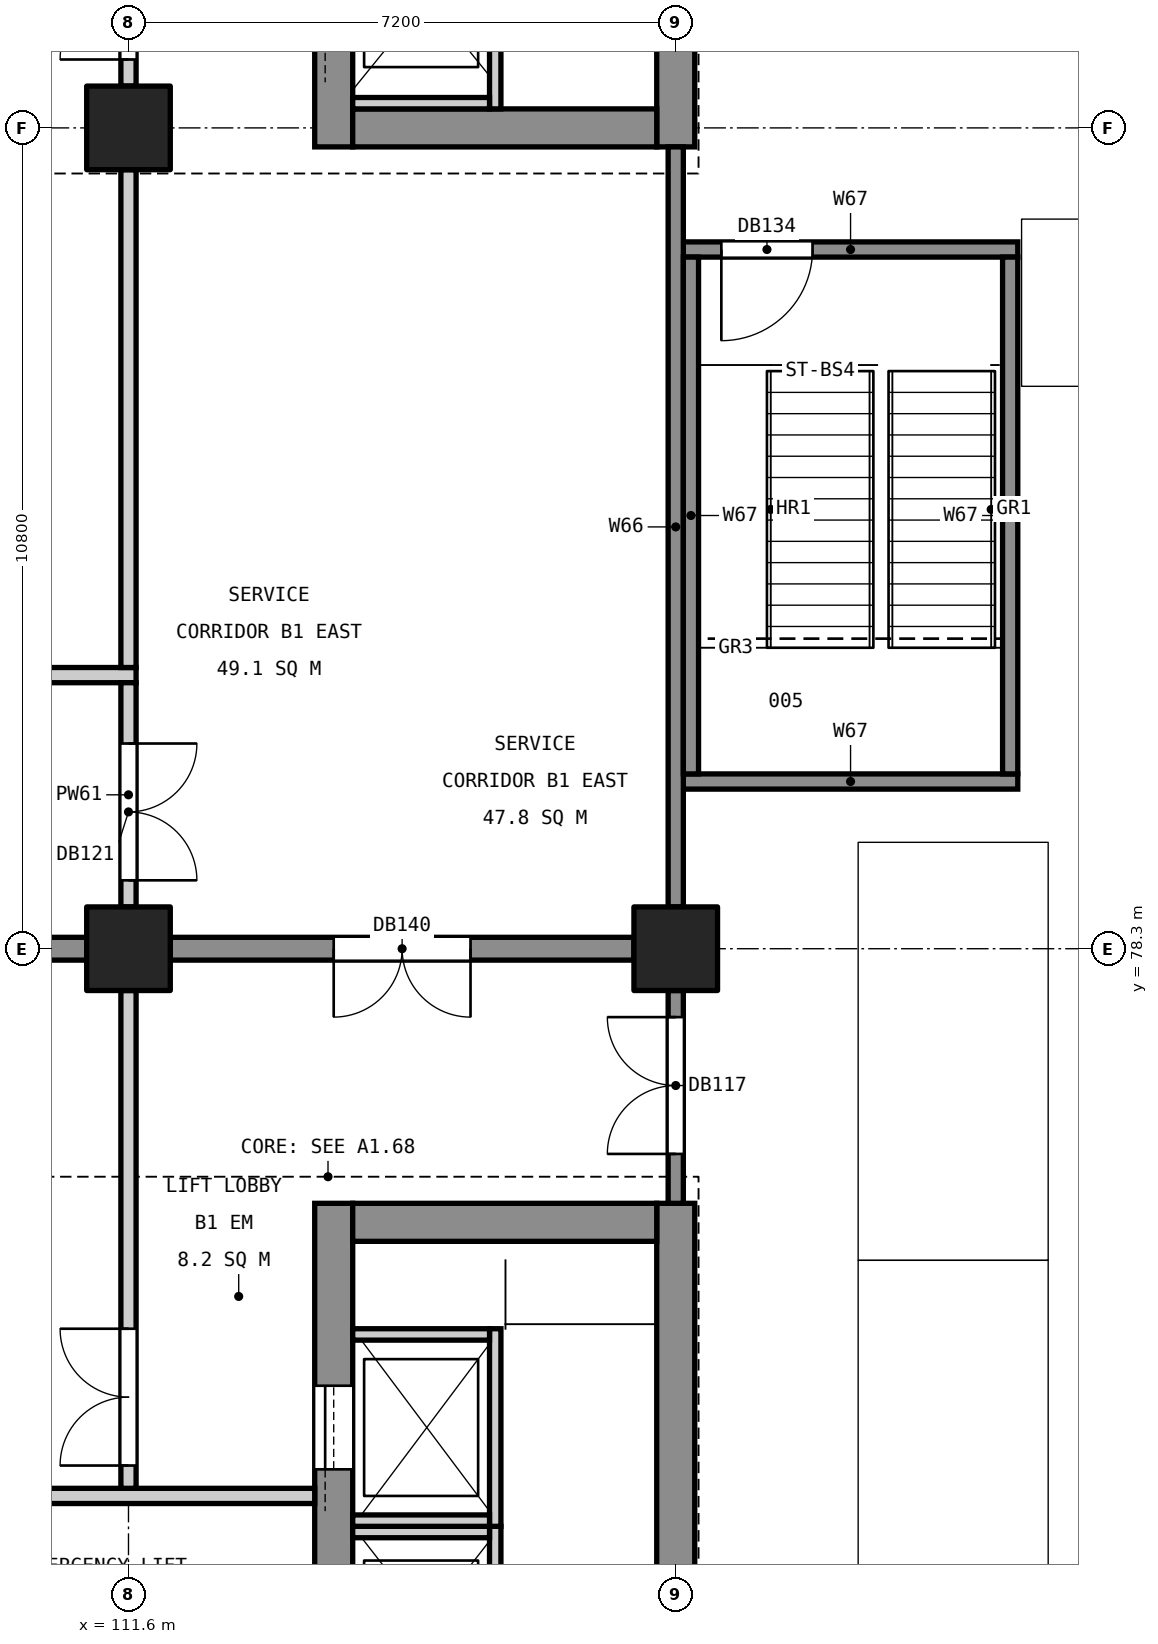
"""IFC4 building model, lengths in metres.
Left out: names, types, materials, properties, quantities, classifications, styles, units other than length and angle.
Written with IfcOpenShell. Run it as: python <this file> out.ifc"""

import sys

from ifc_helpers import new_model, si_unit, direction, frame, frame_2d, origin, origin_2d, place, context, subcontext, project, spatial, rectangle, extrude, element, fill, save


model = new_model("IFC4")
c1 = context("Model", 3, precision=1e-05, world=origin(), true_north=direction((0.0, 1.0)))
c2 = subcontext(c1, "Body", "Model", "MODEL_VIEW")
j1 = project(units=[si_unit("LENGTHUNIT", "METRE"), si_unit("PLANEANGLEUNIT", "RADIAN")], contexts=[c1])
p1 = place(None, origin())
s1 = spatial("IfcSite", under=j1, at=p1, CompositionType="ELEMENT")
p2 = place(p1, origin())
s2 = spatial("IfcBuilding", under=s1, at=p2, CompositionType="ELEMENT")
p3 = place(p2, frame((0.0, 0.0, -4.8)))
s3 = spatial("IfcBuildingStorey", under=s2, at=p3, CompositionType="ELEMENT", Elevation=-4.8)
for number, where, z_axis, x_axis in (
    (1, (118.8, 78.3, 0.0), (0.0, 0.0, 1.0), (1.0, 0.0, 0.0)),
    (2, (111.6, 78.3, 0.0), (0.0, 0.0, 1.0), (1.0, 0.0, 0.0)),
    (3, (111.6, 89.1, 0.0), (0.0, 0.0, 1.0), (1.0, 0.0, 0.0)),
):
    element("IfcColumn", number, at=place(p3, frame(where, z_axis=z_axis, x_axis=x_axis)), inside=s3, PredefinedType="COLUMN", context=c2, shape_type="SweptSolid", body=[
        extrude(rectangle(XDim=1.1, YDim=1.1, at=origin_2d()), origin(), (0.0, 0.0, 1.0), 4.5),
    ])
p4 = place(p3, frame((118.8, 60.05, 0.0), z_axis=(0.0, 0.0, 1.0), x_axis=(0.0, 1.0, 0.0)))
e4 = element("IfcWall", 4, at=p4, inside=s3, PredefinedType="SHEAR", context=c2, shape_type="SweptSolid", body=[
    extrude(rectangle(XDim=14.9, YDim=0.5, at=frame_2d((7.45, 0.0))), origin(), (0.0, 0.0, 1.0), 4.5),
])
p5 = place(p3, frame((114.3, 60.05, 0.0), z_axis=(0.0, 0.0, 1.0), x_axis=(0.0, 1.0, 0.0)))
e5 = element("IfcWall", 5, at=p5, inside=s3, PredefinedType="SHEAR", context=c2, shape_type="SweptSolid", body=[
    extrude(rectangle(XDim=14.9, YDim=0.5, at=frame_2d((7.45, 0.0))), origin(), (0.0, 0.0, 1.0), 4.5),
])
p6 = place(p5, frame((8.85, 0.0, 0.0)))
e6 = element("IfcOpeningElement", 6, at=p6, cuts=e5, PredefinedType="OPENING", context=c2, shape_type="SweptSolid", body=[
    extrude(rectangle(XDim=1.1, YDim=2.1, at=frame_2d((0.55, 1.05))), frame((0.0, 0.26, 0.0), z_axis=(0.0, -1.0, 0.0), x_axis=(1.0, 0.0, 0.0)), (0.0, 0.0, 1.0), 0.52),
])
p7 = place(p5, frame((11.4, 0.0, 0.0)))
e7 = element("IfcOpeningElement", 7, at=p7, cuts=e5, PredefinedType="OPENING", context=c2, shape_type="SweptSolid", body=[
    extrude(rectangle(XDim=1.1, YDim=2.1, at=frame_2d((0.55, 1.05))), frame((0.0, 0.26, 0.0), z_axis=(0.0, -1.0, 0.0), x_axis=(1.0, 0.0, 0.0)), (0.0, 0.0, 1.0), 0.52),
])
p8 = place(p5, frame((3.75, 0.0, 0.0)))
e8 = element("IfcOpeningElement", 8, at=p8, cuts=e5, PredefinedType="OPENING", context=c2, shape_type="SweptSolid", body=[
    extrude(rectangle(XDim=1.0, YDim=2.1, at=frame_2d((0.5, 1.05))), frame((0.0, 0.26, 0.0), z_axis=(0.0, -1.0, 0.0), x_axis=(1.0, 0.0, 0.0)), (0.0, 0.0, 1.0), 0.52),
])
p9 = place(p3, frame((118.55, 74.7, 0.0), z_axis=(0.0, 0.0, 1.0), x_axis=(-1.0, 0.0, 0.0)))
e9 = element("IfcWall", 9, at=p9, inside=s3, PredefinedType="SHEAR", context=c2, shape_type="SweptSolid", body=[
    extrude(rectangle(XDim=4.0, YDim=0.5, at=frame_2d((2.0, 0.0))), origin(), (0.0, 0.0, 1.0), 4.5),
])
p10 = place(p3, frame((118.8, 88.85, 0.0), z_axis=(0.0, 0.0, 1.0), x_axis=(0.0, 1.0, 0.0)))
e10 = element("IfcWall", 10, at=p10, inside=s3, PredefinedType="SHEAR", context=c2, shape_type="SweptSolid", body=[
    extrude(rectangle(XDim=11.3, YDim=0.5, at=frame_2d((5.65, 0.0))), origin(), (0.0, 0.0, 1.0), 4.5),
])
p11 = place(p3, frame((114.3, 88.85, 0.0), z_axis=(0.0, 0.0, 1.0), x_axis=(0.0, 1.0, 0.0)))
e11 = element("IfcWall", 11, at=p11, inside=s3, PredefinedType="SHEAR", context=c2, shape_type="SweptSolid", body=[
    extrude(rectangle(XDim=11.3, YDim=0.5, at=frame_2d((5.65, 0.0))), origin(), (0.0, 0.0, 1.0), 4.5),
])
p12 = place(p11, frame((1.4, 0.0, 0.0)))
e12 = element("IfcOpeningElement", 12, at=p12, cuts=e11, PredefinedType="OPENING", context=c2, shape_type="SweptSolid", body=[
    extrude(rectangle(XDim=1.1, YDim=2.1, at=frame_2d((0.55, 1.05))), frame((0.0, 0.26, 0.0), z_axis=(0.0, -1.0, 0.0), x_axis=(1.0, 0.0, 0.0)), (0.0, 0.0, 1.0), 0.52),
])
p13 = place(p11, frame((6.55, 0.0, 0.0)))
e13 = element("IfcOpeningElement", 13, at=p13, cuts=e11, PredefinedType="OPENING", context=c2, shape_type="SweptSolid", body=[
    extrude(rectangle(XDim=1.0, YDim=2.1, at=frame_2d((0.5, 1.05))), frame((0.0, 0.26, 0.0), z_axis=(0.0, -1.0, 0.0), x_axis=(1.0, 0.0, 0.0)), (0.0, 0.0, 1.0), 0.52),
])
p14 = place(p3, frame((118.55, 89.1, 0.0), z_axis=(0.0, 0.0, 1.0), x_axis=(-1.0, 0.0, 0.0)))
e14 = element("IfcWall", 14, at=p14, inside=s3, PredefinedType="SHEAR", context=c2, shape_type="SweptSolid", body=[
    extrude(rectangle(XDim=4.0, YDim=0.5, at=frame_2d((2.0, 0.0))), origin(), (0.0, 0.0, 1.0), 4.5),
])
p15 = place(p3, frame((118.25, 78.3, 0.0), z_axis=(0.0, 0.0, 1.0), x_axis=(-1.0, 0.0, 0.0)))
e15 = element("IfcWall", 15, at=p15, inside=s3, PredefinedType="SHEAR", context=c2, shape_type="SweptSolid", body=[
    extrude(rectangle(XDim=6.1, YDim=0.3, at=frame_2d((3.05, 0.0))), origin(), (0.0, 0.0, 1.0), 4.5),
])
p16 = place(p15, frame((2.15, 0.0, 0.0)))
e16 = element("IfcOpeningElement", 16, at=p16, cuts=e15, PredefinedType="OPENING", context=c2, shape_type="SweptSolid", body=[
    extrude(rectangle(XDim=1.8, YDim=2.1, at=frame_2d((0.9, 1.05))), frame((0.0, 0.16, 0.0), z_axis=(0.0, -1.0, 0.0), x_axis=(1.0, 0.0, 0.0)), (0.0, 0.0, 1.0), 0.32),
])
p17 = place(p3, frame((111.05, 78.3, 0.0), z_axis=(0.0, 0.0, 1.0), x_axis=(-1.0, 0.0, 0.0)))
e17 = element("IfcWall", 17, at=p17, inside=s3, PredefinedType="SHEAR", context=c2, shape_type="SweptSolid", body=[
    extrude(rectangle(XDim=9.7, YDim=0.3, at=frame_2d((4.85, 0.0))), origin(), (0.0, 0.0, 1.0), 4.5),
])
p18 = place(p3, frame((116.425, 68.2, 0.0), z_axis=(0.0, 0.0, 1.0), x_axis=(0.0, 1.0, 0.0)))
e18 = element("IfcWall", 18, at=p18, inside=s3, PredefinedType="SOLIDWALL", context=c2, shape_type="SweptSolid", body=[
    extrude(rectangle(XDim=2.5, YDim=0.15, at=frame_2d((1.25, 0.0))), origin(), (0.0, 0.0, 1.0), 4.8),
])
p19 = place(p3, frame((116.35, 70.625, 0.0), z_axis=(0.0, 0.0, 1.0), x_axis=(-1.0, 0.0, 0.0)))
e19 = element("IfcWall", 19, at=p19, inside=s3, PredefinedType="SOLIDWALL", context=c2, shape_type="SweptSolid", body=[
    extrude(rectangle(XDim=1.8, YDim=0.15, at=frame_2d((0.9, 0.0))), origin(), (0.0, 0.0, 1.0), 4.8),
])
p20 = place(p3, frame((116.425, 70.7, 0.0), z_axis=(0.0, 0.0, 1.0), x_axis=(0.0, 1.0, 0.0)))
e20 = element("IfcWall", 20, at=p20, inside=s3, PredefinedType="SOLIDWALL", context=c2, shape_type="SweptSolid", body=[
    extrude(rectangle(XDim=2.6, YDim=0.15, at=frame_2d((1.3, 0.0))), origin(), (0.0, 0.0, 1.0), 4.8),
])
for number, where, z_axis, x_axis in (
    (21, (116.35, 70.775, 0.0), (0.0, 0.0, 1.0), (-1.0, 0.0, 0.0)),
    (22, (116.35, 73.225, 0.0), (0.0, 0.0, 1.0), (-1.0, 0.0, 0.0)),
):
    element("IfcWall", number, at=place(p3, frame(where, z_axis=z_axis, x_axis=x_axis)), inside=s3, PredefinedType="SOLIDWALL", context=c2, shape_type="SweptSolid", body=[
        extrude(rectangle(XDim=1.8, YDim=0.15, at=frame_2d((0.9, 0.0))), origin(), (0.0, 0.0, 1.0), 4.8),
    ])
p21 = place(p3, frame((116.425, 92.0, 0.0), z_axis=(0.0, 0.0, 1.0), x_axis=(0.0, -1.0, 0.0)))
e23 = element("IfcWall", 23, at=p21, inside=s3, PredefinedType="SOLIDWALL", context=c2, shape_type="SweptSolid", body=[
    extrude(rectangle(XDim=2.65, YDim=0.15, at=frame_2d((1.325, 0.0))), origin(), (0.0, 0.0, 1.0), 4.8),
])
p22 = place(p3, frame((116.35, 89.425, 0.0), z_axis=(0.0, 0.0, 1.0), x_axis=(-1.0, 0.0, 0.0)))
e24 = element("IfcWall", 24, at=p22, inside=s3, PredefinedType="SOLIDWALL", context=c2, shape_type="SweptSolid", body=[
    extrude(rectangle(XDim=1.8, YDim=0.15, at=frame_2d((0.9, 0.0))), origin(), (0.0, 0.0, 1.0), 4.8),
])
p23 = place(p3, frame((109.75, 71.1, 0.0), z_axis=(0.0, 0.0, 1.0), x_axis=(1.0, 0.0, 0.0)))
e25 = element("IfcWall", 25, at=p23, inside=s3, PredefinedType="PARTITIONING", context=c2, shape_type="SweptSolid", body=[
    extrude(rectangle(XDim=4.3, YDim=0.2, at=frame_2d((2.15, 0.0))), origin(), (0.0, 0.0, 1.0), 3.7),
])
p24 = place(p3, frame((118.9, 80.5, 0.0), z_axis=(0.0, 0.0, 1.0), x_axis=(1.0, 0.0, 0.0)))
e26 = element("IfcWall", 26, at=p24, inside=s3, PredefinedType="SOLIDWALL", context=c2, shape_type="SweptSolid", body=[
    extrude(rectangle(XDim=4.4, YDim=0.2, at=frame_2d((2.2, 0.0))), origin(), (0.0, 0.0, 1.0), 4.35),
])
p25 = place(p3, frame((100.7, 81.9, 0.0), z_axis=(0.0, 0.0, 1.0), x_axis=(1.0, 0.0, 0.0)))
e27 = element("IfcWall", 27, at=p25, inside=s3, PredefinedType="PARTITIONING", context=c2, shape_type="SweptSolid", body=[
    extrude(rectangle(XDim=11.0, YDim=0.2, at=frame_2d((5.5, 0.0))), origin(), (0.0, 0.0, 1.0), 3.7),
])
p26 = place(p3, frame((118.9, 87.5, 0.0), z_axis=(0.0, 0.0, 1.0), x_axis=(1.0, 0.0, 0.0)))
e28 = element("IfcWall", 28, at=p26, inside=s3, PredefinedType="SOLIDWALL", context=c2, shape_type="SweptSolid", body=[
    extrude(rectangle(XDim=4.4, YDim=0.2, at=frame_2d((2.2, 0.0))), origin(), (0.0, 0.0, 1.0), 4.35),
])
p27 = place(p26, frame((0.5, 0.0, 0.0)))
e29 = element("IfcOpeningElement", 29, at=p27, cuts=e28, PredefinedType="OPENING", context=c2, shape_type="SweptSolid", body=[
    extrude(rectangle(XDim=1.2, YDim=2.1, at=frame_2d((0.6, 1.05))), frame((0.0, 0.11, 0.0), z_axis=(0.0, -1.0, 0.0), x_axis=(1.0, 0.0, 0.0)), (0.0, 0.0, 1.0), 0.22),
])
p28 = place(p3, frame((111.6, 71.2, 0.0), z_axis=(0.0, 0.0, 1.0), x_axis=(0.0, 1.0, 0.0)))
e30 = element("IfcWall", 30, at=p28, inside=s3, PredefinedType="PARTITIONING", context=c2, shape_type="SweptSolid", body=[
    extrude(rectangle(XDim=6.55, YDim=0.2, at=frame_2d((3.275, 0.0))), origin(), (0.0, 0.0, 1.0), 3.4),
])
p29 = place(p28, frame((0.3, 0.0, 0.0)))
e31 = element("IfcOpeningElement", 31, at=p29, cuts=e30, PredefinedType="OPENING", context=c2, shape_type="SweptSolid", body=[
    extrude(rectangle(XDim=1.8, YDim=2.1, at=frame_2d((0.9, 1.05))), frame((0.0, 0.11, 0.0), z_axis=(0.0, -1.0, 0.0), x_axis=(1.0, 0.0, 0.0)), (0.0, 0.0, 1.0), 0.22),
])
p30 = place(p3, frame((111.6, 78.85, 0.0), z_axis=(0.0, 0.0, 1.0), x_axis=(0.0, 1.0, 0.0)))
e32 = element("IfcWall", 32, at=p30, inside=s3, PredefinedType="PARTITIONING", context=c2, shape_type="SweptSolid", body=[
    extrude(rectangle(XDim=2.95, YDim=0.2, at=frame_2d((1.475, 0.0))), origin(), (0.0, 0.0, 1.0), 3.4),
])
p31 = place(p30, frame((0.35, 0.0, 0.0)))
e33 = element("IfcOpeningElement", 33, at=p31, cuts=e32, PredefinedType="OPENING", context=c2, shape_type="SweptSolid", body=[
    extrude(rectangle(XDim=1.8, YDim=2.1, at=frame_2d((0.9, 1.05))), frame((0.0, 0.11, 0.0), z_axis=(0.0, -1.0, 0.0), x_axis=(1.0, 0.0, 0.0)), (0.0, 0.0, 1.0), 0.22),
])
p32 = place(p3, frame((111.6, 82.0, 0.0), z_axis=(0.0, 0.0, 1.0), x_axis=(0.0, 1.0, 0.0)))
e34 = element("IfcWall", 34, at=p32, inside=s3, PredefinedType="PARTITIONING", context=c2, shape_type="SweptSolid", body=[
    extrude(rectangle(XDim=6.55, YDim=0.2, at=frame_2d((3.275, 0.0))), origin(), (0.0, 0.0, 1.0), 3.4),
])
p33 = place(p3, frame((111.6, 89.65, 0.0), z_axis=(0.0, 0.0, 1.0), x_axis=(0.0, 1.0, 0.0)))
e35 = element("IfcWall", 35, at=p33, inside=s3, PredefinedType="PARTITIONING", context=c2, shape_type="SweptSolid", body=[
    extrude(rectangle(XDim=9.7, YDim=0.2, at=frame_2d((4.85, 0.0))), origin(), (0.0, 0.0, 1.0), 3.4),
])
p34 = place(p33, frame((0.35, 0.0, 0.0)))
e36 = element("IfcOpeningElement", 36, at=p34, cuts=e35, PredefinedType="OPENING", context=c2, shape_type="SweptSolid", body=[
    extrude(rectangle(XDim=1.8, YDim=2.1, at=frame_2d((0.9, 1.05))), frame((0.0, 0.11, 0.0), z_axis=(0.0, -1.0, 0.0), x_axis=(1.0, 0.0, 0.0)), (0.0, 0.0, 1.0), 0.22),
])
p35 = place(p3, frame((118.8, 74.95, 0.0), z_axis=(0.0, 0.0, 1.0), x_axis=(0.0, 1.0, 0.0)))
e37 = element("IfcWall", 37, at=p35, inside=s3, PredefinedType="SOLIDWALL", context=c2, shape_type="SweptSolid", body=[
    extrude(rectangle(XDim=2.8, YDim=0.2, at=frame_2d((1.4, 0.0))), origin(), (0.0, 0.0, 1.0), 4.5),
])
p36 = place(p35, frame((0.65, 0.0, 0.0)))
e38 = element("IfcOpeningElement", 38, at=p36, cuts=e37, PredefinedType="OPENING", context=c2, shape_type="SweptSolid", body=[
    extrude(rectangle(XDim=1.8, YDim=2.1, at=frame_2d((0.9, 1.05))), frame((0.0, 0.11, 0.0), z_axis=(0.0, -1.0, 0.0), x_axis=(1.0, 0.0, 0.0)), (0.0, 0.0, 1.0), 0.22),
])
p37 = place(p3, frame((118.8, 78.85, 0.0), z_axis=(0.0, 0.0, 1.0), x_axis=(0.0, 1.0, 0.0)))
e39 = element("IfcWall", 39, at=p37, inside=s3, PredefinedType="SOLIDWALL", context=c2, shape_type="SweptSolid", body=[
    extrude(rectangle(XDim=10.0, YDim=0.2, at=frame_2d((5.0, 0.0))), origin(), (0.0, 0.0, 1.0), 4.5),
])
p38 = place(p3, frame((119.0, 80.6, 0.0), z_axis=(0.0, 0.0, 1.0), x_axis=(0.0, 1.0, 0.0)))
e40 = element("IfcWall", 40, at=p38, inside=s3, PredefinedType="SOLIDWALL", context=c2, shape_type="SweptSolid", body=[
    extrude(rectangle(XDim=6.8, YDim=0.2, at=frame_2d((3.4, 0.0))), origin(), (0.0, 0.0, 1.0), 4.5),
])
p39 = place(p3, frame((123.2, 80.6, 0.0), z_axis=(0.0, 0.0, 1.0), x_axis=(0.0, 1.0, 0.0)))
e41 = element("IfcWall", 41, at=p39, inside=s3, PredefinedType="SOLIDWALL", context=c2, shape_type="SweptSolid", body=[
    extrude(rectangle(XDim=6.8, YDim=0.2, at=frame_2d((3.4, 0.0))), origin(), (0.0, 0.0, 1.0), 4.35),
])
p40 = place(p7, origin())
e42 = element("IfcDoor", 42, at=p40, inside=s3, OperationType="SLIDING_TO_LEFT", PredefinedType="DOOR", context=c2, shape_type="SweptSolid", body=[
    extrude(rectangle(XDim=1.1, YDim=2.1, at=frame_2d((0.55, 1.05))), frame((0.0, 0.025, 0.0), z_axis=(0.0, -1.0, 0.0), x_axis=(1.0, 0.0, 0.0)), (0.0, 0.0, 1.0), 0.05),
])
fill(e7, e42)
p41 = place(p29, origin())
e43 = element("IfcDoor", 43, at=p41, inside=s3, OperationType="DOUBLE_DOOR_SINGLE_SWING", PredefinedType="DOOR", context=c2, shape_type="SweptSolid", body=[
    extrude(rectangle(XDim=1.8, YDim=2.1, at=frame_2d((0.9, 1.05))), frame((0.0, 0.025, 0.0), z_axis=(0.0, -1.0, 0.0), x_axis=(1.0, 0.0, 0.0)), (0.0, 0.0, 1.0), 0.05),
])
fill(e31, e43)
p42 = place(p34, origin())
e44 = element("IfcDoor", 44, at=p42, inside=s3, OperationType="DOUBLE_DOOR_SINGLE_SWING", PredefinedType="DOOR", context=c2, shape_type="SweptSolid", body=[
    extrude(rectangle(XDim=1.8, YDim=2.1, at=frame_2d((0.9, 1.05))), frame((0.0, 0.025, 0.0), z_axis=(0.0, -1.0, 0.0), x_axis=(1.0, 0.0, 0.0)), (0.0, 0.0, 1.0), 0.05),
])
fill(e36, e44)
p43 = place(p36, origin())
e45 = element("IfcDoor", 45, at=p43, inside=s3, OperationType="DOUBLE_DOOR_SINGLE_SWING", PredefinedType="DOOR", context=c2, shape_type="SweptSolid", body=[
    extrude(rectangle(XDim=1.8, YDim=2.1, at=frame_2d((0.9, 1.05))), frame((0.0, 0.025, 0.0), z_axis=(0.0, -1.0, 0.0), x_axis=(1.0, 0.0, 0.0)), (0.0, 0.0, 1.0), 0.05),
])
fill(e38, e45)
p44 = place(p31, frame((1.8, 0.0, 0.0), z_axis=(0.0, 0.0, 1.0), x_axis=(-1.0, 0.0, 0.0)))
e46 = element("IfcDoor", 46, at=p44, inside=s3, OperationType="DOUBLE_DOOR_SINGLE_SWING", PredefinedType="DOOR", context=c2, shape_type="SweptSolid", body=[
    extrude(rectangle(XDim=1.8, YDim=2.1, at=frame_2d((0.9, 1.05))), frame((0.0, 0.025, 0.0), z_axis=(0.0, -1.0, 0.0), x_axis=(1.0, 0.0, 0.0)), (0.0, 0.0, 1.0), 0.05),
])
fill(e33, e46)
p45 = place(p27, frame((1.2, 0.0, 0.0), z_axis=(0.0, 0.0, 1.0), x_axis=(-1.0, 0.0, 0.0)))
e47 = element("IfcDoor", 47, at=p45, inside=s3, OperationType="SINGLE_SWING_RIGHT", PredefinedType="DOOR", context=c2, shape_type="SweptSolid", body=[
    extrude(rectangle(XDim=1.2, YDim=2.1, at=frame_2d((0.6, 1.05))), frame((0.0, 0.025, 0.0), z_axis=(0.0, -1.0, 0.0), x_axis=(1.0, 0.0, 0.0)), (0.0, 0.0, 1.0), 0.05),
])
fill(e29, e47)
p46 = place(p16, origin())
e48 = element("IfcDoor", 48, at=p46, inside=s3, OperationType="DOUBLE_DOOR_SINGLE_SWING", PredefinedType="DOOR", context=c2, shape_type="SweptSolid", body=[
    extrude(rectangle(XDim=1.8, YDim=2.1, at=frame_2d((0.9, 1.05))), frame((0.0, 0.025, 0.0), z_axis=(0.0, -1.0, 0.0), x_axis=(1.0, 0.0, 0.0)), (0.0, 0.0, 1.0), 0.05),
])
fill(e16, e48)
save(model, sys.argv[1])
